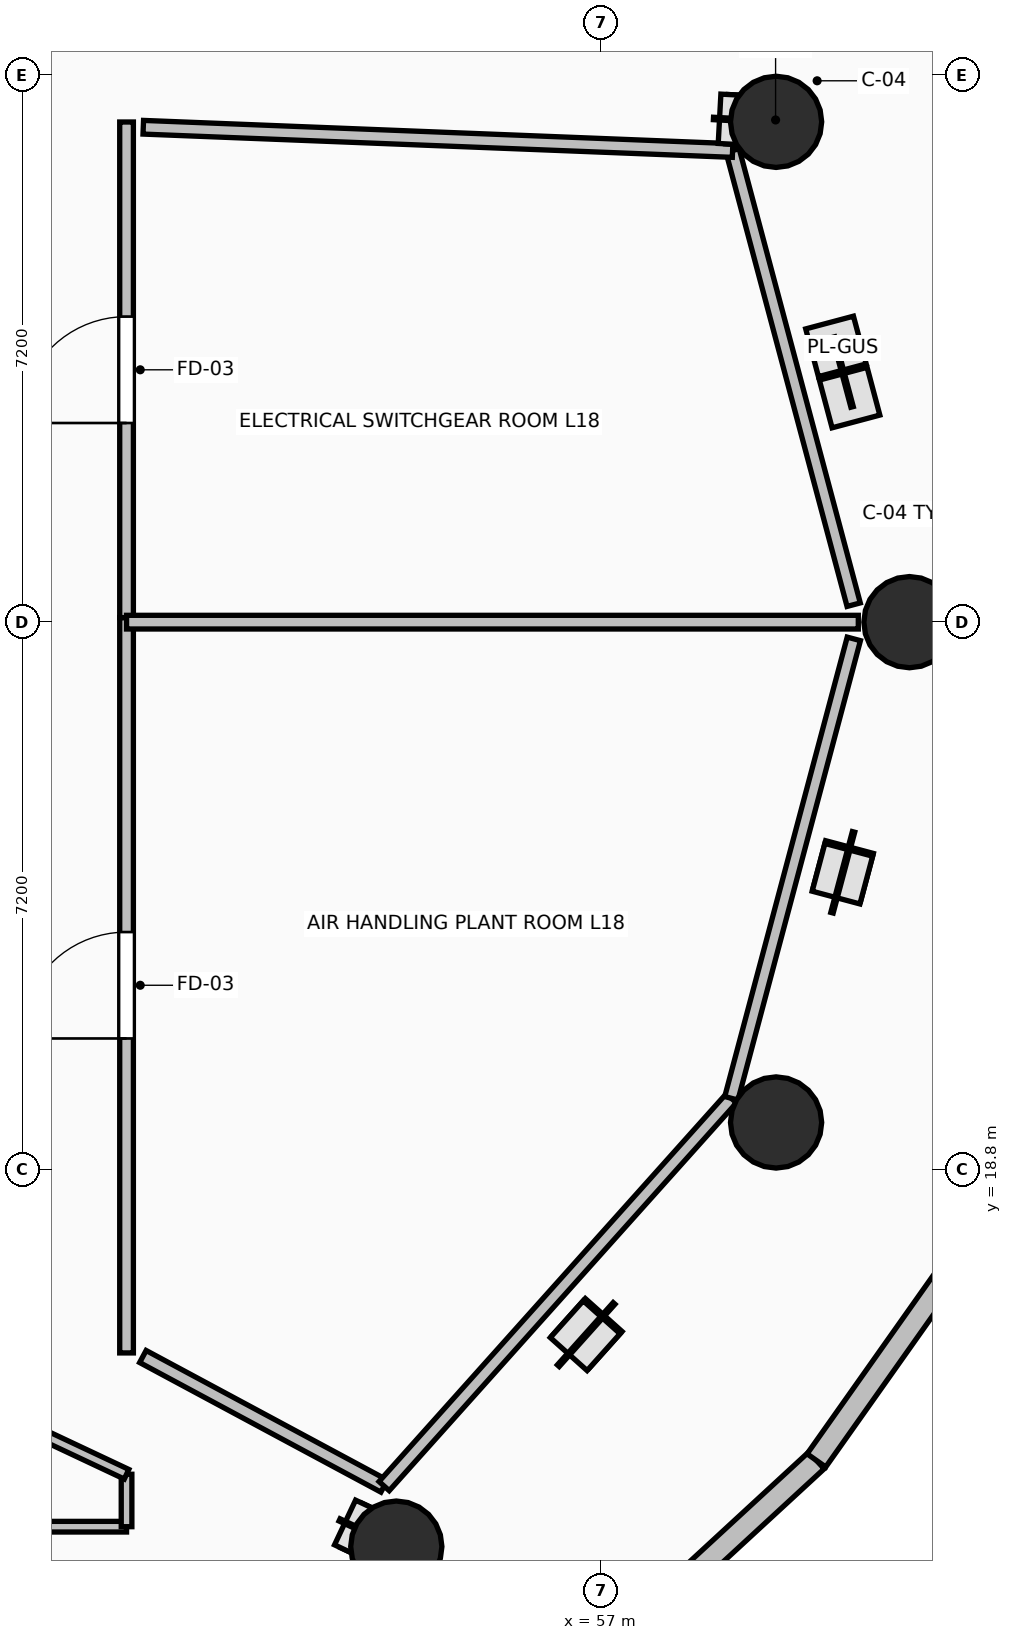
"""IFC4 building model, lengths in metres.
Left out: names, types, materials, properties, quantities, classifications, styles, units other than length and angle.
Written with IfcOpenShell. Run it as: python <this file> out.ifc"""

import sys

from ifc_helpers import new_model, si_unit, direction, frame, frame_2d, origin, origin_2d, place, context, subcontext, project, spatial, rectangle, circle, extrude, element, fill, save


model = new_model("IFC4")
c1 = context("Model", 3, precision=1e-05, world=origin(), true_north=direction((0.0, 1.0)))
c2 = subcontext(c1, "Body", "Model", "MODEL_VIEW")
j1 = project(units=[si_unit("LENGTHUNIT", "METRE"), si_unit("PLANEANGLEUNIT", "RADIAN")], contexts=[c1])
p1 = place(None, origin())
s1 = spatial("IfcSite", under=j1, at=p1, CompositionType="ELEMENT")
p2 = place(p1, origin())
s2 = spatial("IfcBuilding", under=s1, at=p2, CompositionType="ELEMENT")
p3 = place(p2, frame((0.0, 0.0, 69.5)))
s3 = spatial("IfcBuildingStorey", under=s2, at=p3, CompositionType="ELEMENT", Elevation=69.5)
for number, where, z_axis, x_axis in (
    (1, (61.05, 26.0, 0.0), (0.0, 0.0, 1.0), (1.0, 0.0, 0.0)),
    (2, (59.295, 32.582, 0.0), (0.0, 0.0, 1.0), (0.924, 0.383, 0.0)),
    (3, (54.299, 13.838, 0.0), (0.0, 0.0, 1.0), (0.707, -0.707, 0.0)),
    (4, (59.295, 19.418, 0.0), (0.0, 0.0, 1.0), (0.924, -0.383, 0.0)),
):
    element("IfcColumn", number, at=place(p3, frame(where, z_axis=z_axis, x_axis=x_axis)), inside=s3, PredefinedType="COLUMN", context=c2, shape_type="SweptSolid", body=[
        extrude(circle(Radius=0.6, at=origin_2d()), origin(), (0.0, 0.0, 1.0), 4.8),
    ])
p4 = place(p3, frame((56.562, 11.964, 0.0), z_axis=(0.0, 0.0, 1.0), x_axis=(0.735416718093, 0.677615119924, 0.0)))
e5 = element("IfcWall", 5, at=p4, inside=s3, PredefinedType="STANDARD", context=c2, shape_type="SweptSolid", body=[
    extrude(rectangle(XDim=4.439, YDim=0.3, at=frame_2d((2.22, 0.0))), origin(), (0.0, 0.0, 1.0), 4.5),
])
p5 = place(p3, frame((59.826, 14.972, 0.0), z_axis=(0.0, 0.0, 1.0), x_axis=(0.57716435238, 0.81662801222, 0.0)))
e6 = element("IfcWall", 6, at=p5, inside=s3, PredefinedType="STANDARD", context=c2, shape_type="SweptSolid", body=[
    extrude(rectangle(XDim=4.202, YDim=0.3, at=frame_2d((2.101, 0.0))), origin(), (0.0, 0.0, 1.0), 4.5),
])
p6 = place(p3, frame((50.75, 16.386, 0.0), z_axis=(0.0, 0.0, 1.0), x_axis=(0.0, 1.0, 0.0)))
e7 = element("IfcWall", 7, at=p6, inside=s3, PredefinedType="PARTITIONING", context=c2, shape_type="SweptSolid", body=[
    extrude(rectangle(XDim=9.674, YDim=0.18, at=frame_2d((4.837, 0.0))), origin(), (0.0, 0.0, 1.0), 4.134),
])
p7 = place(p6, frame((4.137, 0.0, 0.0)))
e8 = element("IfcOpeningElement", 8, at=p7, cuts=e7, PredefinedType="OPENING", context=c2, shape_type="SweptSolid", body=[
    extrude(rectangle(XDim=1.4, YDim=2.2, at=frame_2d((0.7, 1.1))), frame((0.0, 0.105, 0.0), z_axis=(0.0, -1.0, 0.0), x_axis=(1.0, 0.0, 0.0)), (0.0, 0.0, 1.0), 0.21),
])
p8 = place(p3, frame((50.75, 26.06, 0.0), z_axis=(0.0, 0.0, 1.0), x_axis=(0.0, 1.0, 0.0)))
e9 = element("IfcWall", 9, at=p8, inside=s3, PredefinedType="PARTITIONING", context=c2, shape_type="SweptSolid", body=[
    extrude(rectangle(XDim=6.52, YDim=0.18, at=frame_2d((3.26, 0.0))), origin(), (0.0, 0.0, 1.0), 3.482),
])
p9 = place(p8, frame((2.56, 0.0, 0.0)))
e10 = element("IfcOpeningElement", 10, at=p9, cuts=e9, PredefinedType="OPENING", context=c2, shape_type="SweptSolid", body=[
    extrude(rectangle(XDim=1.4, YDim=2.2, at=frame_2d((0.7, 1.1))), frame((0.0, 0.105, 0.0), z_axis=(0.0, -1.0, 0.0), x_axis=(1.0, 0.0, 0.0)), (0.0, 0.0, 1.0), 0.21),
])
p10 = place(p3, frame((60.377, 26.0, 0.0), z_axis=(0.0, 0.0, 1.0), x_axis=(-1.0, 0.0, 0.0)))
e11 = element("IfcWall", 11, at=p10, inside=s3, PredefinedType="PARTITIONING", context=c2, shape_type="SweptSolid", body=[
    extrude(rectangle(XDim=9.627, YDim=0.18, at=frame_2d((4.813, 0.0))), origin(), (0.0, 0.0, 1.0), 3.482),
])
p11 = place(p3, frame((43.214, 14.1, 0.0), z_axis=(0.0, 0.0, 1.0), x_axis=(1.0, 0.0, 0.0)))
e12 = element("IfcWall", 12, at=p11, inside=s3, PredefinedType="PARTITIONING", context=c2, shape_type="SweptSolid", body=[
    extrude(rectangle(XDim=7.536, YDim=0.14, at=frame_2d((3.768, 0.0))), origin(), (0.0, 0.0, 1.0), 3.482),
])
p12 = place(p3, frame((50.75, 14.1, 0.0), z_axis=(0.0, 0.0, 1.0), x_axis=(0.0, 1.0, 0.0)))
e13 = element("IfcWall", 13, at=p12, inside=s3, PredefinedType="PARTITIONING", context=c2, shape_type="SweptSolid", body=[
    extrude(rectangle(XDim=0.69, YDim=0.14, at=frame_2d((0.345, 0.0))), origin(), (0.0, 0.0, 1.0), 4.189),
])
p13 = place(p3, frame((50.75, 14.79, 0.0), z_axis=(0.0, 0.0, 1.0), x_axis=(-0.90476180298, 0.425917926212, 0.0)))
e14 = element("IfcWall", 14, at=p13, inside=s3, PredefinedType="PARTITIONING", context=c2, shape_type="SweptSolid", body=[
    extrude(rectangle(XDim=1.167, YDim=0.14, at=frame_2d((0.583, 0.0))), origin(), (0.0, 0.0, 1.0), 4.134),
])
p14 = place(p3, frame((50.965, 16.339, 0.0), z_axis=(0.0, 0.0, 1.0), x_axis=(0.880923283176, -0.473259093054, 0.0)))
e15 = element("IfcWall", 15, at=p14, inside=s3, PredefinedType="PARTITIONING", context=c2, shape_type="SweptSolid", body=[
    extrude(rectangle(XDim=3.603, YDim=0.18, at=frame_2d((1.801, 0.0))), origin(), (0.0, 0.0, 1.0), 4.134),
])
p15 = place(p3, frame((54.139, 14.634, 0.0), z_axis=(0.0, 0.0, 1.0), x_axis=(0.667048046009, 0.745014700738, 0.0)))
e16 = element("IfcWall", 16, at=p15, inside=s3, PredefinedType="PARTITIONING", context=c2, shape_type="SweptSolid", body=[
    extrude(rectangle(XDim=6.848, YDim=0.18, at=frame_2d((3.424, 0.0))), origin(), (0.0, 0.0, 1.0), 3.482),
])
p16 = place(p3, frame((58.707, 19.736, 0.0), z_axis=(0.0, 0.0, 1.0), x_axis=(0.257567905164, 0.966260200065, 0.0)))
e17 = element("IfcWall", 17, at=p16, inside=s3, PredefinedType="PARTITIONING", context=c2, shape_type="SweptSolid", body=[
    extrude(rectangle(XDim=6.255, YDim=0.18, at=frame_2d((3.127, 0.0))), origin(), (0.0, 0.0, 1.0), 3.482),
])
p17 = place(p3, frame((60.316, 26.23, 0.0), z_axis=(0.0, 0.0, 1.0), x_axis=(-0.257611046893, 0.966248699103, 0.0)))
e18 = element("IfcWall", 18, at=p17, inside=s3, PredefinedType="PARTITIONING", context=c2, shape_type="SweptSolid", body=[
    extrude(rectangle(XDim=6.184, YDim=0.18, at=frame_2d((3.092, 0.0))), origin(), (0.0, 0.0, 1.0), 3.482),
])
p18 = place(p3, frame((58.723, 32.205, 0.0), z_axis=(0.0, 0.0, 1.0), x_axis=(-0.999222475973, 0.039426431616, 0.0)))
e19 = element("IfcWall", 19, at=p18, inside=s3, PredefinedType="PARTITIONING", context=c2, shape_type="SweptSolid", body=[
    extrude(rectangle(XDim=7.759, YDim=0.18, at=frame_2d((3.879, 0.0))), origin(), (0.0, 0.0, 1.0), 4.134),
])
p19 = place(p7, origin())
e20 = element("IfcDoor", 20, at=p19, inside=s3, OperationType="DOUBLE_SWING_LEFT", PredefinedType="DOOR", context=c2, shape_type="SweptSolid", body=[
    extrude(rectangle(XDim=1.4, YDim=2.2, at=frame_2d((0.7, 1.1))), frame((0.0, 0.025, 0.0), z_axis=(0.0, -1.0, 0.0), x_axis=(1.0, 0.0, 0.0)), (0.0, 0.0, 1.0), 0.05),
])
fill(e8, e20)
p20 = place(p9, origin())
e21 = element("IfcDoor", 21, at=p20, inside=s3, OperationType="DOUBLE_SWING_LEFT", PredefinedType="DOOR", context=c2, shape_type="SweptSolid", body=[
    extrude(rectangle(XDim=1.4, YDim=2.2, at=frame_2d((0.7, 1.1))), frame((0.0, 0.025, 0.0), z_axis=(0.0, -1.0, 0.0), x_axis=(1.0, 0.0, 0.0)), (0.0, 0.0, 1.0), 0.05),
])
fill(e10, e21)
save(model, sys.argv[1])
